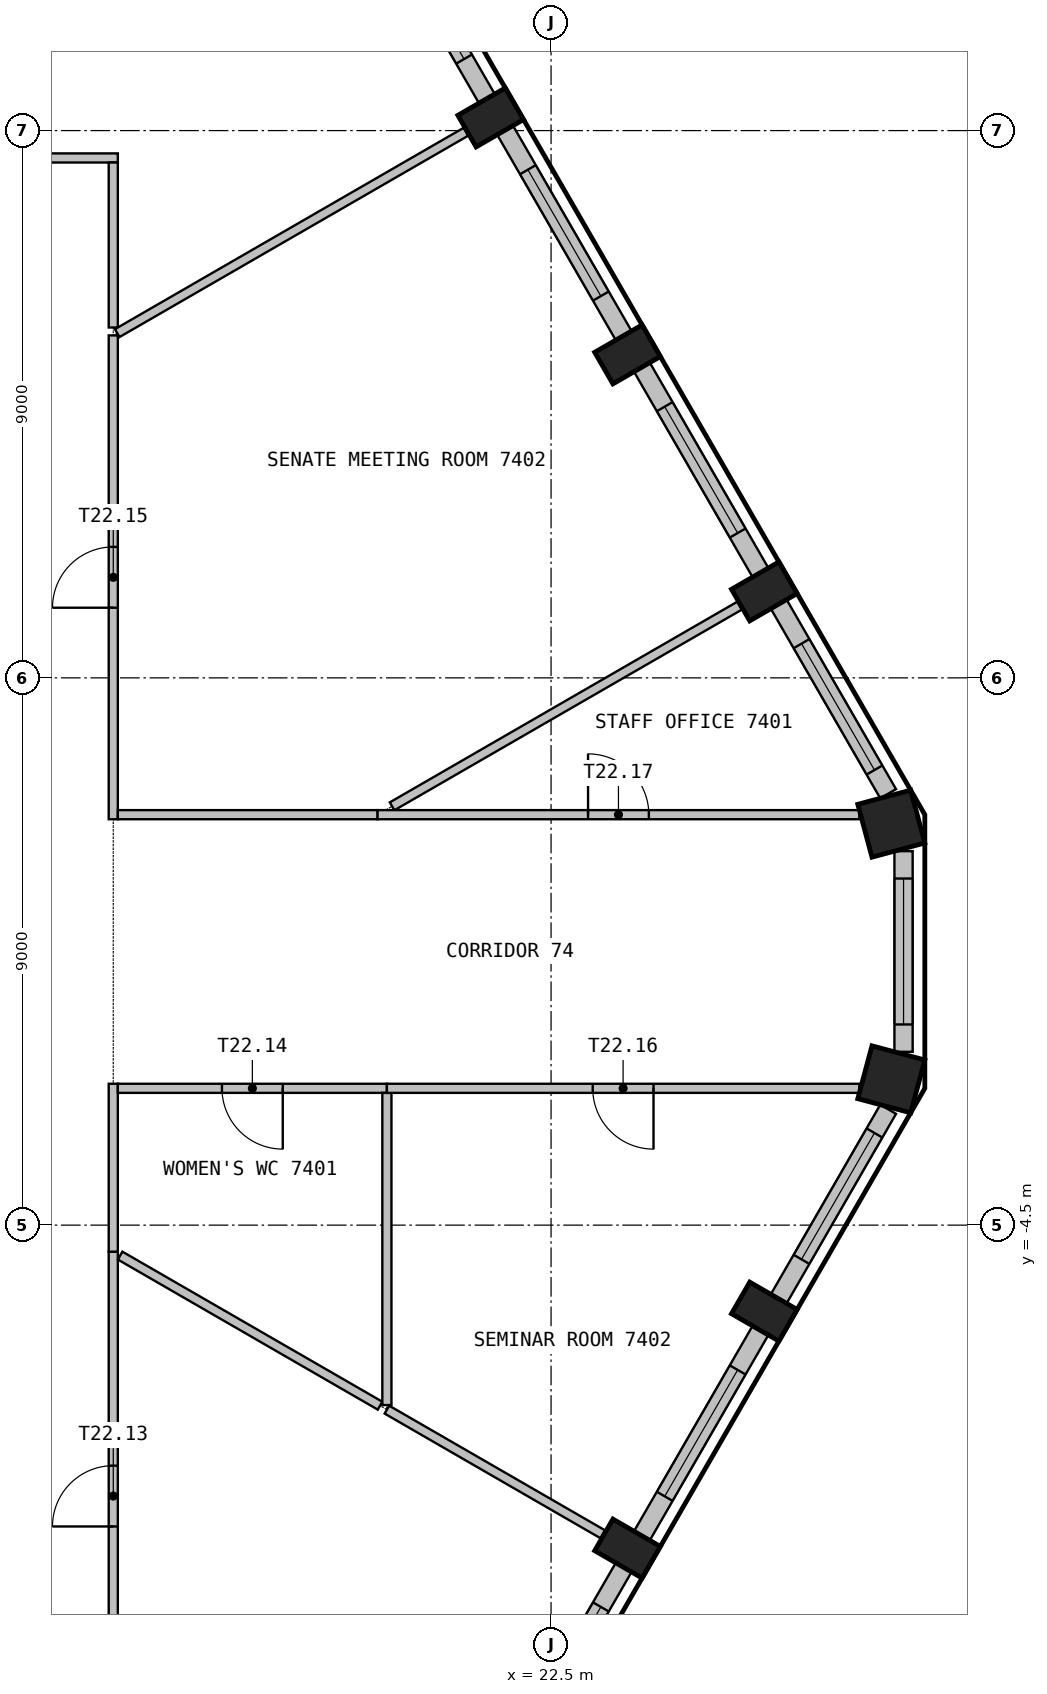
"""IFC4 building model, lengths in metres.
Left out: names, types, materials, properties, quantities, classifications, styles, units other than length and angle.
Written with IfcOpenShell. Run it as: python <this file> out.ifc"""

import sys

from ifc_helpers import new_model, si_unit, direction, frame, frame_2d, origin, origin_2d, place, context, subcontext, project, spatial, rectangle, extrude, element, fill, save


model = new_model("IFC4")
c1 = context("Model", 3, precision=1e-05, world=origin(), true_north=direction((0.0, 1.0)))
c2 = subcontext(c1, "Body", "Model", "MODEL_VIEW")
j1 = project(units=[si_unit("LENGTHUNIT", "METRE"), si_unit("PLANEANGLEUNIT", "RADIAN")], contexts=[c1])
p1 = place(None, origin())
s1 = spatial("IfcSite", under=j1, at=p1, CompositionType="ELEMENT")
p2 = place(p1, origin())
s2 = spatial("IfcBuilding", under=s1, at=p2, CompositionType="ELEMENT")
p3 = place(p2, frame((0.0, 0.0, 298.2)))
s3 = spatial("IfcBuildingStorey", under=s2, at=p3, CompositionType="ELEMENT", Elevation=298.2)
for number, where, z_axis, x_axis in (
    (1, (23.757, -9.819, 0.0), (0.0, 0.0, 1.0), (0.5, 0.866, 0.0)),
    (2, (26.007, -5.922, 0.0), (0.0, 0.0, 1.0), (0.5, 0.866, 0.0)),
):
    element("IfcColumn", number, at=place(p3, frame(where, z_axis=z_axis, x_axis=x_axis)), inside=s3, PredefinedType="COLUMN", context=c2, shape_type="SweptSolid", body=[
        extrude(rectangle(XDim=0.6, YDim=0.9, at=origin_2d()), origin(), (0.0, 0.0, 1.0), 3.575),
    ])
for number, where, z_axis, x_axis in (
    (3, (28.096, -2.102, 0.0), (0.0, 0.0, 1.0), (0.259, 0.966, 0.0)),
    (4, (28.096, 2.102, 0.0), (0.0, 0.0, 1.0), (-0.259, 0.966, 0.0)),
):
    element("IfcColumn", number, at=place(p3, frame(where, z_axis=z_axis, x_axis=x_axis)), inside=s3, PredefinedType="COLUMN", context=c2, shape_type="SweptSolid", body=[
        extrude(rectangle(XDim=0.9, YDim=0.9, at=origin_2d()), origin(), (0.0, 0.0, 1.0), 3.575),
    ])
for number, where, z_axis, x_axis in (
    (5, (26.007, 5.922, 0.0), (0.0, 0.0, 1.0), (-0.5, 0.866, 0.0)),
    (6, (23.757, 9.819, 0.0), (0.0, 0.0, 1.0), (-0.5, 0.866, 0.0)),
    (7, (21.507, 13.716, 0.0), (0.0, 0.0, 1.0), (-0.5, 0.866, 0.0)),
):
    element("IfcColumn", number, at=place(p3, frame(where, z_axis=z_axis, x_axis=x_axis)), inside=s3, PredefinedType="COLUMN", context=c2, shape_type="SweptSolid", body=[
        extrude(rectangle(XDim=0.6, YDim=0.9, at=origin_2d()), origin(), (0.0, 0.0, 1.0), 3.575),
    ])
p4 = place(p3, frame((21.744, -13.506, 0.0), z_axis=(0.0, 0.0, 1.0), x_axis=(0.499984428715, 0.866034393683, 0.0)))
e8 = element("IfcWall", 8, at=p4, inside=s3, PredefinedType="SOLIDWALL", context=c2, shape_type="SweptSolid", body=[
    extrude(rectangle(XDim=3.899, YDim=0.3, at=frame_2d((1.949, 0.0))), origin(), (0.0, 0.0, 1.0), 3.575),
])
p5 = place(p4, frame((0.75, 0.0, 0.9)))
e9 = element("IfcOpeningElement", 9, at=p5, cuts=e8, PredefinedType="OPENING", context=c2, shape_type="SweptSolid", body=[
    extrude(rectangle(XDim=2.4, YDim=2.1, at=frame_2d((1.2, 1.05))), frame((0.0, 0.16, 0.0), z_axis=(0.0, -1.0, 0.0), x_axis=(1.0, 0.0, 0.0)), (0.0, 0.0, 1.0), 0.32),
])
p6 = place(p3, frame((23.994, -9.609, 0.0), z_axis=(0.0, 0.0, 1.0), x_axis=(0.500011542666, 0.866018739521, 0.0)))
e10 = element("IfcWall", 10, at=p6, inside=s3, PredefinedType="SOLIDWALL", context=c2, shape_type="SweptSolid", body=[
    extrude(rectangle(XDim=3.899, YDim=0.3, at=frame_2d((1.949, 0.0))), origin(), (0.0, 0.0, 1.0), 3.575),
])
p7 = place(p6, frame((0.75, 0.0, 0.9)))
e11 = element("IfcOpeningElement", 11, at=p7, cuts=e10, PredefinedType="OPENING", context=c2, shape_type="SweptSolid", body=[
    extrude(rectangle(XDim=2.4, YDim=2.1, at=frame_2d((1.2, 1.05))), frame((0.0, 0.16, 0.0), z_axis=(0.0, -1.0, 0.0), x_axis=(1.0, 0.0, 0.0)), (0.0, 0.0, 1.0), 0.32),
])
p8 = place(p3, frame((26.244, -5.712, 0.0), z_axis=(0.0, 0.0, 1.0), x_axis=(0.499969057507, 0.866043267704, 0.0)))
e12 = element("IfcWall", 12, at=p8, inside=s3, PredefinedType="SOLIDWALL", context=c2, shape_type="SweptSolid", body=[
    extrude(rectangle(XDim=3.599, YDim=0.3, at=frame_2d((1.8, 0.0))), origin(), (0.0, 0.0, 1.0), 3.575),
])
p9 = place(p8, frame((0.75, 0.0, 0.9)))
e13 = element("IfcOpeningElement", 13, at=p9, cuts=e12, PredefinedType="OPENING", context=c2, shape_type="SweptSolid", body=[
    extrude(rectangle(XDim=2.4, YDim=2.1, at=frame_2d((1.2, 1.05))), frame((0.0, 0.16, 0.0), z_axis=(0.0, -1.0, 0.0), x_axis=(1.0, 0.0, 0.0)), (0.0, 0.0, 1.0), 0.32),
])
p10 = place(p3, frame((28.297, -1.65, 0.0), z_axis=(0.0, 0.0, 1.0), x_axis=(0.0, 1.0, 0.0)))
e14 = element("IfcWall", 14, at=p10, inside=s3, PredefinedType="SOLIDWALL", context=c2, shape_type="SweptSolid", body=[
    extrude(rectangle(XDim=3.3, YDim=0.3, at=frame_2d((1.65, 0.0))), origin(), (0.0, 0.0, 1.0), 3.575),
])
p11 = place(p10, frame((0.45, 0.0, 0.9)))
e15 = element("IfcOpeningElement", 15, at=p11, cuts=e14, PredefinedType="OPENING", context=c2, shape_type="SweptSolid", body=[
    extrude(rectangle(XDim=2.4, YDim=2.1, at=frame_2d((1.2, 1.05))), frame((0.0, 0.16, 0.0), z_axis=(0.0, -1.0, 0.0), x_axis=(1.0, 0.0, 0.0)), (0.0, 0.0, 1.0), 0.32),
])
p12 = place(p3, frame((28.044, 2.595, 0.0), z_axis=(0.0, 0.0, 1.0), x_axis=(-0.499969057507, 0.866043267704, 0.0)))
e16 = element("IfcWall", 16, at=p12, inside=s3, PredefinedType="SOLIDWALL", context=c2, shape_type="SweptSolid", body=[
    extrude(rectangle(XDim=3.599, YDim=0.3, at=frame_2d((1.8, 0.0))), origin(), (0.0, 0.0, 1.0), 3.575),
])
p13 = place(p12, frame((0.45, 0.0, 0.9)))
e17 = element("IfcOpeningElement", 17, at=p13, cuts=e16, PredefinedType="OPENING", context=c2, shape_type="SweptSolid", body=[
    extrude(rectangle(XDim=2.4, YDim=2.1, at=frame_2d((1.2, 1.05))), frame((0.0, 0.16, 0.0), z_axis=(0.0, -1.0, 0.0), x_axis=(1.0, 0.0, 0.0)), (0.0, 0.0, 1.0), 0.32),
])
p14 = place(p3, frame((25.944, 6.232, 0.0), z_axis=(0.0, 0.0, 1.0), x_axis=(-0.500011542666, 0.866018739521, 0.0)))
e18 = element("IfcWall", 18, at=p14, inside=s3, PredefinedType="SOLIDWALL", context=c2, shape_type="SweptSolid", body=[
    extrude(rectangle(XDim=3.899, YDim=0.3, at=frame_2d((1.949, 0.0))), origin(), (0.0, 0.0, 1.0), 3.575),
])
p15 = place(p14, frame((0.75, 0.0, 0.9)))
e19 = element("IfcOpeningElement", 19, at=p15, cuts=e18, PredefinedType="OPENING", context=c2, shape_type="SweptSolid", body=[
    extrude(rectangle(XDim=2.4, YDim=2.1, at=frame_2d((1.2, 1.05))), frame((0.0, 0.16, 0.0), z_axis=(0.0, -1.0, 0.0), x_axis=(1.0, 0.0, 0.0)), (0.0, 0.0, 1.0), 0.32),
])
p16 = place(p3, frame((23.694, 10.129, 0.0), z_axis=(0.0, 0.0, 1.0), x_axis=(-0.499984428715, 0.866034393683, 0.0)))
e20 = element("IfcWall", 20, at=p16, inside=s3, PredefinedType="SOLIDWALL", context=c2, shape_type="SweptSolid", body=[
    extrude(rectangle(XDim=3.899, YDim=0.3, at=frame_2d((1.949, 0.0))), origin(), (0.0, 0.0, 1.0), 3.575),
])
p17 = place(p16, frame((0.75, 0.0, 0.9)))
e21 = element("IfcOpeningElement", 21, at=p17, cuts=e20, PredefinedType="OPENING", context=c2, shape_type="SweptSolid", body=[
    extrude(rectangle(XDim=2.4, YDim=2.1, at=frame_2d((1.2, 1.05))), frame((0.0, 0.16, 0.0), z_axis=(0.0, -1.0, 0.0), x_axis=(1.0, 0.0, 0.0)), (0.0, 0.0, 1.0), 0.32),
])
p18 = place(p3, frame((21.444, 14.027, 0.0), z_axis=(0.0, 0.0, 1.0), x_axis=(-0.50001992892, 0.866013897511, 0.0)))
e22 = element("IfcWall", 22, at=p18, inside=s3, PredefinedType="SOLIDWALL", context=c2, shape_type="SweptSolid", body=[
    extrude(rectangle(XDim=3.599, YDim=0.3, at=frame_2d((1.8, 0.0))), origin(), (0.0, 0.0, 1.0), 3.575),
])
p19 = place(p18, frame((0.75, 0.0, 0.9)))
e23 = element("IfcOpeningElement", 23, at=p19, cuts=e22, PredefinedType="OPENING", context=c2, shape_type="SweptSolid", body=[
    extrude(rectangle(XDim=2.4, YDim=2.1, at=frame_2d((1.2, 1.05))), frame((0.0, 0.16, 0.0), z_axis=(0.0, -1.0, 0.0), x_axis=(1.0, 0.0, 0.0)), (0.0, 0.0, 1.0), 0.32),
])
p20 = place(p3, frame((15.375, 13.05, 0.0), z_axis=(0.0, 0.0, 1.0), x_axis=(-1.0, 0.0, 0.0)))
e24 = element("IfcWall", 24, at=p20, inside=s3, PredefinedType="PARTITIONING", context=c2, shape_type="SweptSolid", body=[
    extrude(rectangle(XDim=4.125, YDim=0.15, at=frame_2d((2.062, 0.0))), origin(), (0.0, 0.0, 1.0), 3.575),
])
p21 = place(p20, frame((1.562, 0.0, 0.0)))
e25 = element("IfcOpeningElement", 25, at=p21, cuts=e24, PredefinedType="OPENING", context=c2, shape_type="SweptSolid", body=[
    extrude(rectangle(XDim=1.0, YDim=2.1, at=frame_2d((0.5, 1.05))), frame((0.0, 0.085, 0.0), z_axis=(0.0, -1.0, 0.0), x_axis=(1.0, 0.0, 0.0)), (0.0, 0.0, 1.0), 0.17),
])
p22 = place(p3, frame((15.3, -12.975, 0.0), z_axis=(0.0, 0.0, 1.0), x_axis=(0.0, 1.0, 0.0)))
e26 = element("IfcWall", 26, at=p22, inside=s3, PredefinedType="PARTITIONING", context=c2, shape_type="SweptSolid", body=[
    extrude(rectangle(XDim=8.039, YDim=0.15, at=frame_2d((4.02, 0.0))), origin(), (0.0, 0.0, 1.0), 3.575),
])
p23 = place(p22, frame((3.52, 0.0, 0.0)))
e27 = element("IfcOpeningElement", 27, at=p23, cuts=e26, PredefinedType="OPENING", context=c2, shape_type="SweptSolid", body=[
    extrude(rectangle(XDim=1.0, YDim=2.1, at=frame_2d((0.5, 1.05))), frame((0.0, 0.085, 0.0), z_axis=(0.0, -1.0, 0.0), x_axis=(1.0, 0.0, 0.0)), (0.0, 0.0, 1.0), 0.17),
])
p24 = place(p3, frame((15.3, -4.936, 0.0), z_axis=(0.0, 0.0, 1.0), x_axis=(0.0, 1.0, 0.0)))
e28 = element("IfcWall", 28, at=p24, inside=s3, PredefinedType="PARTITIONING", context=c2, shape_type="SweptSolid", body=[
    extrude(rectangle(XDim=2.761, YDim=0.15, at=frame_2d((1.38, 0.0))), origin(), (0.0, 0.0, 1.0), 3.575),
])
p25 = place(p3, frame((15.413, -5.001, 0.0), z_axis=(0.0, 0.0, 1.0), x_axis=(0.866034039096, -0.499985042903, 0.0)))
e29 = element("IfcWall", 29, at=p25, inside=s3, PredefinedType="PARTITIONING", context=c2, shape_type="SweptSolid", body=[
    extrude(rectangle(XDim=4.936, YDim=0.15, at=frame_2d((2.468, 0.0))), origin(), (0.0, 0.0, 1.0), 3.575),
])
p26 = place(p3, frame((19.8, -2.25, 0.0), z_axis=(0.0, 0.0, 1.0), x_axis=(-1.0, 0.0, 0.0)))
e30 = element("IfcWall", 30, at=p26, inside=s3, PredefinedType="PARTITIONING", context=c2, shape_type="SweptSolid", body=[
    extrude(rectangle(XDim=4.425, YDim=0.15, at=frame_2d((2.212, 0.0))), origin(), (0.0, 0.0, 1.0), 3.575),
])
p27 = place(p26, frame((1.712, 0.0, 0.0)))
e31 = element("IfcOpeningElement", 31, at=p27, cuts=e30, PredefinedType="OPENING", context=c2, shape_type="SweptSolid", body=[
    extrude(rectangle(XDim=1.0, YDim=2.1, at=frame_2d((0.5, 1.05))), frame((0.0, 0.085, 0.0), z_axis=(0.0, -1.0, 0.0), x_axis=(1.0, 0.0, 0.0)), (0.0, 0.0, 1.0), 0.17),
])
p28 = place(p3, frame((15.3, 2.175, 0.0), z_axis=(0.0, 0.0, 1.0), x_axis=(0.0, 1.0, 0.0)))
e32 = element("IfcWall", 32, at=p28, inside=s3, PredefinedType="PARTITIONING", context=c2, shape_type="SweptSolid", body=[
    extrude(rectangle(XDim=7.957, YDim=0.15, at=frame_2d((3.979, 0.0))), origin(), (0.0, 0.0, 1.0), 3.575),
])
p29 = place(p28, frame((3.479, 0.0, 0.0)))
e33 = element("IfcOpeningElement", 33, at=p29, cuts=e32, PredefinedType="OPENING", context=c2, shape_type="SweptSolid", body=[
    extrude(rectangle(XDim=1.0, YDim=2.1, at=frame_2d((0.5, 1.05))), frame((0.0, 0.085, 0.0), z_axis=(0.0, -1.0, 0.0), x_axis=(1.0, 0.0, 0.0)), (0.0, 0.0, 1.0), 0.17),
])
p30 = place(p3, frame((15.375, 2.25, 0.0), z_axis=(0.0, 0.0, 1.0), x_axis=(1.0, 0.0, 0.0)))
e34 = element("IfcWall", 34, at=p30, inside=s3, PredefinedType="PARTITIONING", context=c2, shape_type="SweptSolid", body=[
    extrude(rectangle(XDim=4.272, YDim=0.15, at=frame_2d((2.136, 0.0))), origin(), (0.0, 0.0, 1.0), 3.575),
])
p31 = place(p3, frame((15.3, 10.262, 0.0), z_axis=(0.0, 0.0, 1.0), x_axis=(0.0, 1.0, 0.0)))
e35 = element("IfcWall", 35, at=p31, inside=s3, PredefinedType="PARTITIONING", context=c2, shape_type="SweptSolid", body=[
    extrude(rectangle(XDim=2.713, YDim=0.15, at=frame_2d((1.356, 0.0))), origin(), (0.0, 0.0, 1.0), 3.575),
])
p32 = place(p3, frame((21.1, 13.481, 0.0), z_axis=(0.0, 0.0, 1.0), x_axis=(-0.865995273703, -0.500052183202, 0.0)))
e36 = element("IfcWall", 36, at=p32, inside=s3, PredefinedType="PARTITIONING", context=c2, shape_type="SweptSolid", body=[
    extrude(rectangle(XDim=6.623, YDim=0.15, at=frame_2d((3.312, 0.0))), origin(), (0.0, 0.0, 1.0), 3.575),
])
p33 = place(p3, frame((25.6, 5.687, 0.0), z_axis=(0.0, 0.0, 1.0), x_axis=(-0.86601246718, -0.500022406186, 0.0)))
e37 = element("IfcWall", 37, at=p33, inside=s3, PredefinedType="PARTITIONING", context=c2, shape_type="SweptSolid", body=[
    extrude(rectangle(XDim=6.599, YDim=0.15, at=frame_2d((3.3, 0.0))), origin(), (0.0, 0.0, 1.0), 3.575),
])
p34 = place(p3, frame((19.647, 2.25, 0.0), z_axis=(0.0, 0.0, 1.0), x_axis=(1.0, 0.0, 0.0)))
e38 = element("IfcWall", 38, at=p34, inside=s3, PredefinedType="PARTITIONING", context=c2, shape_type="SweptSolid", body=[
    extrude(rectangle(XDim=7.923, YDim=0.15, at=frame_2d((3.961, 0.0))), origin(), (0.0, 0.0, 1.0), 3.575),
])
p35 = place(p34, frame((3.461, 0.0, 0.0)))
e39 = element("IfcOpeningElement", 39, at=p35, cuts=e38, PredefinedType="OPENING", context=c2, shape_type="SweptSolid", body=[
    extrude(rectangle(XDim=1.0, YDim=2.1, at=frame_2d((0.5, 1.05))), frame((0.0, 0.085, 0.0), z_axis=(0.0, -1.0, 0.0), x_axis=(1.0, 0.0, 0.0)), (0.0, 0.0, 1.0), 0.17),
])
p36 = place(p3, frame((19.8, -2.325, 0.0), z_axis=(0.0, 0.0, 1.0), x_axis=(0.0, -1.0, 0.0)))
e40 = element("IfcWall", 40, at=p36, inside=s3, PredefinedType="PARTITIONING", context=c2, shape_type="SweptSolid", body=[
    extrude(rectangle(XDim=5.134, YDim=0.15, at=frame_2d((2.567, 0.0))), origin(), (0.0, 0.0, 1.0), 3.575),
])
p37 = place(p3, frame((19.8, -7.534, 0.0), z_axis=(0.0, 0.0, 1.0), x_axis=(0.865995170514, -0.500052361904, 0.0)))
e41 = element("IfcWall", 41, at=p37, inside=s3, PredefinedType="PARTITIONING", context=c2, shape_type="SweptSolid", body=[
    extrude(rectangle(XDim=4.1, YDim=0.15, at=frame_2d((2.05, 0.0))), origin(), (0.0, 0.0, 1.0), 3.575),
])
p38 = place(p3, frame((27.57, -2.25, 0.0), z_axis=(0.0, 0.0, 1.0), x_axis=(-1.0, 0.0, 0.0)))
e42 = element("IfcWall", 42, at=p38, inside=s3, PredefinedType="PARTITIONING", context=c2, shape_type="SweptSolid", body=[
    extrude(rectangle(XDim=7.77, YDim=0.15, at=frame_2d((3.885, 0.0))), origin(), (0.0, 0.0, 1.0), 3.575),
])
p39 = place(p38, frame((3.385, 0.0, 0.0)))
e43 = element("IfcOpeningElement", 43, at=p39, cuts=e42, PredefinedType="OPENING", context=c2, shape_type="SweptSolid", body=[
    extrude(rectangle(XDim=1.0, YDim=2.1, at=frame_2d((0.5, 1.05))), frame((0.0, 0.085, 0.0), z_axis=(0.0, -1.0, 0.0), x_axis=(1.0, 0.0, 0.0)), (0.0, 0.0, 1.0), 0.17),
])
p40 = place(p5, origin())
e44 = element("IfcWindow", 44, at=p40, inside=s3, PartitioningType="SINGLE_PANEL", PredefinedType="WINDOW", context=c2, shape_type="SweptSolid", body=[
    extrude(rectangle(XDim=2.4, YDim=2.1, at=frame_2d((1.2, 1.05))), frame((0.0, 0.03, 0.0), z_axis=(0.0, -1.0, 0.0), x_axis=(1.0, 0.0, 0.0)), (0.0, 0.0, 1.0), 0.06),
])
fill(e9, e44)
p41 = place(p7, origin())
e45 = element("IfcWindow", 45, at=p41, inside=s3, PartitioningType="SINGLE_PANEL", PredefinedType="WINDOW", context=c2, shape_type="SweptSolid", body=[
    extrude(rectangle(XDim=2.4, YDim=2.1, at=frame_2d((1.2, 1.05))), frame((0.0, 0.03, 0.0), z_axis=(0.0, -1.0, 0.0), x_axis=(1.0, 0.0, 0.0)), (0.0, 0.0, 1.0), 0.06),
])
fill(e11, e45)
p42 = place(p9, origin())
e46 = element("IfcWindow", 46, at=p42, inside=s3, PartitioningType="SINGLE_PANEL", PredefinedType="WINDOW", context=c2, shape_type="SweptSolid", body=[
    extrude(rectangle(XDim=2.4, YDim=2.1, at=frame_2d((1.2, 1.05))), frame((0.0, 0.03, 0.0), z_axis=(0.0, -1.0, 0.0), x_axis=(1.0, 0.0, 0.0)), (0.0, 0.0, 1.0), 0.06),
])
fill(e13, e46)
p43 = place(p11, origin())
e47 = element("IfcWindow", 47, at=p43, inside=s3, PartitioningType="SINGLE_PANEL", PredefinedType="WINDOW", context=c2, shape_type="SweptSolid", body=[
    extrude(rectangle(XDim=2.4, YDim=2.1, at=frame_2d((1.2, 1.05))), frame((0.0, 0.03, 0.0), z_axis=(0.0, -1.0, 0.0), x_axis=(1.0, 0.0, 0.0)), (0.0, 0.0, 1.0), 0.06),
])
fill(e15, e47)
p44 = place(p13, origin())
e48 = element("IfcWindow", 48, at=p44, inside=s3, PartitioningType="SINGLE_PANEL", PredefinedType="WINDOW", context=c2, shape_type="SweptSolid", body=[
    extrude(rectangle(XDim=2.4, YDim=2.1, at=frame_2d((1.2, 1.05))), frame((0.0, 0.03, 0.0), z_axis=(0.0, -1.0, 0.0), x_axis=(1.0, 0.0, 0.0)), (0.0, 0.0, 1.0), 0.06),
])
fill(e17, e48)
p45 = place(p15, origin())
e49 = element("IfcWindow", 49, at=p45, inside=s3, PartitioningType="SINGLE_PANEL", PredefinedType="WINDOW", context=c2, shape_type="SweptSolid", body=[
    extrude(rectangle(XDim=2.4, YDim=2.1, at=frame_2d((1.2, 1.05))), frame((0.0, 0.03, 0.0), z_axis=(0.0, -1.0, 0.0), x_axis=(1.0, 0.0, 0.0)), (0.0, 0.0, 1.0), 0.06),
])
fill(e19, e49)
p46 = place(p17, origin())
e50 = element("IfcWindow", 50, at=p46, inside=s3, PartitioningType="SINGLE_PANEL", PredefinedType="WINDOW", context=c2, shape_type="SweptSolid", body=[
    extrude(rectangle(XDim=2.4, YDim=2.1, at=frame_2d((1.2, 1.05))), frame((0.0, 0.03, 0.0), z_axis=(0.0, -1.0, 0.0), x_axis=(1.0, 0.0, 0.0)), (0.0, 0.0, 1.0), 0.06),
])
fill(e21, e50)
p47 = place(p19, origin())
e51 = element("IfcWindow", 51, at=p47, inside=s3, PartitioningType="SINGLE_PANEL", PredefinedType="WINDOW", context=c2, shape_type="SweptSolid", body=[
    extrude(rectangle(XDim=2.4, YDim=2.1, at=frame_2d((1.2, 1.05))), frame((0.0, 0.03, 0.0), z_axis=(0.0, -1.0, 0.0), x_axis=(1.0, 0.0, 0.0)), (0.0, 0.0, 1.0), 0.06),
])
fill(e23, e51)
p48 = place(p23, origin())
e52 = element("IfcDoor", 52, at=p48, inside=s3, OperationType="SINGLE_SWING_LEFT", PredefinedType="DOOR", context=c2, shape_type="SweptSolid", body=[
    extrude(rectangle(XDim=1.0, YDim=2.1, at=frame_2d((0.5, 1.05))), frame((0.0, 0.025, 0.0), z_axis=(0.0, -1.0, 0.0), x_axis=(1.0, 0.0, 0.0)), (0.0, 0.0, 1.0), 0.05),
])
fill(e27, e52)
p49 = place(p27, origin())
e53 = element("IfcDoor", 53, at=p49, inside=s3, OperationType="SINGLE_SWING_RIGHT", PredefinedType="DOOR", context=c2, shape_type="SweptSolid", body=[
    extrude(rectangle(XDim=1.0, YDim=2.1, at=frame_2d((0.5, 1.05))), frame((0.0, 0.025, 0.0), z_axis=(0.0, -1.0, 0.0), x_axis=(1.0, 0.0, 0.0)), (0.0, 0.0, 1.0), 0.05),
])
fill(e31, e53)
p50 = place(p29, origin())
e54 = element("IfcDoor", 54, at=p50, inside=s3, OperationType="SINGLE_SWING_RIGHT", PredefinedType="DOOR", context=c2, shape_type="SweptSolid", body=[
    extrude(rectangle(XDim=1.0, YDim=2.1, at=frame_2d((0.5, 1.05))), frame((0.0, 0.025, 0.0), z_axis=(0.0, -1.0, 0.0), x_axis=(1.0, 0.0, 0.0)), (0.0, 0.0, 1.0), 0.05),
])
fill(e33, e54)
p51 = place(p39, origin())
e55 = element("IfcDoor", 55, at=p51, inside=s3, OperationType="SINGLE_SWING_LEFT", PredefinedType="DOOR", context=c2, shape_type="SweptSolid", body=[
    extrude(rectangle(XDim=1.0, YDim=2.1, at=frame_2d((0.5, 1.05))), frame((0.0, 0.025, 0.0), z_axis=(0.0, -1.0, 0.0), x_axis=(1.0, 0.0, 0.0)), (0.0, 0.0, 1.0), 0.05),
])
fill(e43, e55)
p52 = place(p35, origin())
e56 = element("IfcDoor", 56, at=p52, inside=s3, OperationType="SINGLE_SWING_RIGHT", PredefinedType="DOOR", context=c2, shape_type="SweptSolid", body=[
    extrude(rectangle(XDim=1.0, YDim=2.1, at=frame_2d((0.5, 1.05))), frame((0.0, 0.025, 0.0), z_axis=(0.0, -1.0, 0.0), x_axis=(1.0, 0.0, 0.0)), (0.0, 0.0, 1.0), 0.05),
])
fill(e39, e56)
save(model, sys.argv[1])
